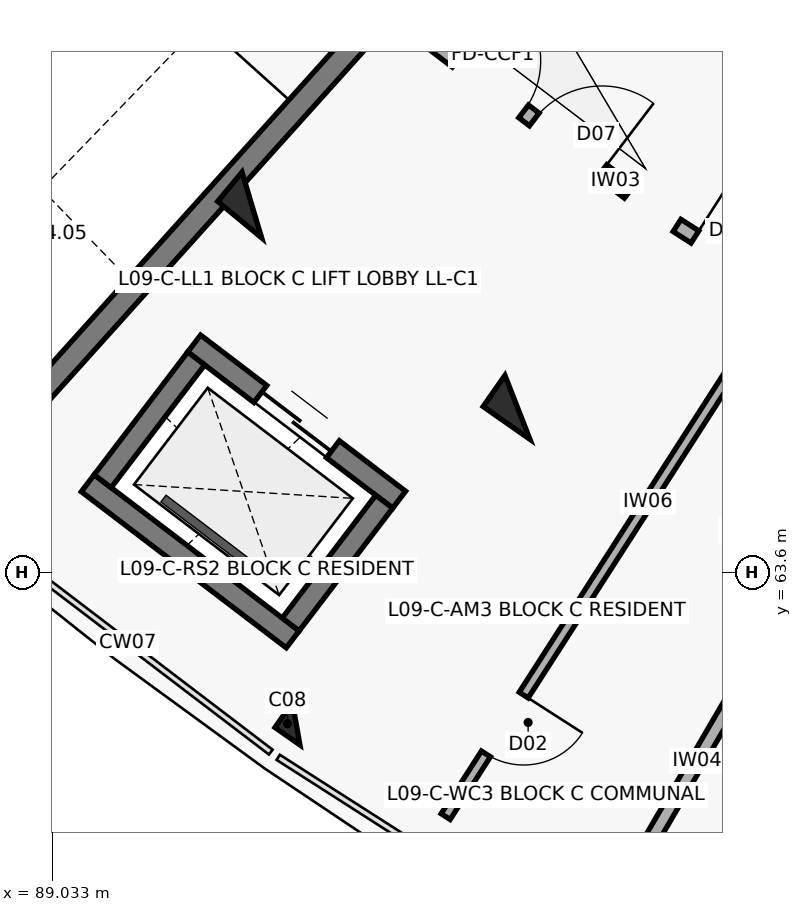
"""IFC4 building model, lengths in metres.
Left out: names, types, materials, properties, quantities, classifications, styles, units other than length and angle.
Written with IfcOpenShell. Run it as: python <this file> out.ifc"""

import sys

from ifc_helpers import new_model, si_unit, direction, frame, frame_2d, origin, origin_2d, place, context, subcontext, project, spatial, rectangle, extrude, element, fill, save


model = new_model("IFC4")
c1 = context("Model", 3, precision=1e-05, world=origin(), true_north=direction((0.0, 1.0)))
c2 = subcontext(c1, "Body", "Model", "MODEL_VIEW")
j1 = project(units=[si_unit("LENGTHUNIT", "METRE"), si_unit("PLANEANGLEUNIT", "RADIAN")], contexts=[c1])
p1 = place(None, origin())
s1 = spatial("IfcSite", under=j1, at=p1, CompositionType="ELEMENT")
p2 = place(p1, origin())
s2 = spatial("IfcBuilding", under=s1, at=p2, CompositionType="ELEMENT")
p3 = place(p2, frame((0.0, 0.0, 29.8)))
s3 = spatial("IfcBuildingStorey", under=s2, at=p3, CompositionType="ELEMENT", Elevation=29.8)
for number, where, z_axis, x_axis in (
    (1, (91.658, 68.43, 0.0), (0.0, 0.0, 1.0), (-0.638, -0.77, 0.0)),
    (2, (95.152, 65.768, 0.0), (0.0, 0.0, 1.0), (-0.573, -0.82, 0.0)),
):
    element("IfcColumn", number, at=place(p3, frame(where, z_axis=z_axis, x_axis=x_axis)), inside=s3, PredefinedType="COLUMN", context=c2, shape_type="SweptSolid", body=[
        extrude(rectangle(XDim=0.5, YDim=0.75, at=origin_2d()), origin(), (0.0, 0.0, 1.0), 3.1),
    ])
p4 = place(p3, frame((92.241, 61.605, 0.0), z_axis=(0.0, 0.0, 1.0), x_axis=(-0.573004420611, -0.819552276527, 0.0)))
e3 = element("IfcColumn", 3, at=p4, inside=s3, PredefinedType="COLUMN", context=c2, shape_type="SweptSolid", body=[
    extrude(rectangle(XDim=0.4, YDim=0.4, at=origin_2d()), origin(), (0.0, 0.0, 1.0), 3.1),
])
p5 = place(p3, frame((90.671, 73.287, 0.0), z_axis=(0.0, 0.0, 1.0), x_axis=(-0.668885797871, -0.743365179038, 0.0)))
e4 = element("IfcWall", 4, at=p5, inside=s3, PredefinedType="SHEAR", context=c2, shape_type="SweptSolid", body=[
    extrude(rectangle(XDim=7.69, YDim=0.3, at=frame_2d((3.845, 0.0))), origin(), (0.0, 0.0, 1.0), 3.1),
])
p6 = place(p3, frame((93.325, 70.899, 0.0), z_axis=(0.0, 0.0, 1.0), x_axis=(-0.668868253964, -0.743380964808, 0.0)))
e5 = element("IfcWall", 5, at=p6, inside=s3, PredefinedType="SHEAR", context=c2, shape_type="SweptSolid", body=[
    extrude(rectangle(XDim=7.69, YDim=0.3, at=frame_2d((3.845, 0.0))), origin(), (0.0, 0.0, 1.0), 3.1),
])
p7 = place(p3, frame((90.899, 66.607, 0.0), z_axis=(0.0, 0.0, 1.0), x_axis=(0.795439986025, -0.606032365994, 0.0)))
e6 = element("IfcWall", 6, at=p7, inside=s3, PredefinedType="SHEAR", context=c2, shape_type="SweptSolid", body=[
    extrude(rectangle(XDim=3.39, YDim=0.28, at=frame_2d((1.695, 0.0))), origin(), (0.0, 0.0, 1.0), 3.1),
])
p8 = place(p7, frame((1.095, 0.0, 0.0)))
e7 = element("IfcOpeningElement", 7, at=p8, cuts=e6, PredefinedType="OPENING", context=c2, shape_type="SweptSolid", body=[
    extrude(rectangle(XDim=1.2, YDim=2.15, at=frame_2d((0.6, 1.075))), frame((0.0, 0.15, 0.0), z_axis=(0.0, -1.0, 0.0), x_axis=(1.0, 0.0, 0.0)), (0.0, 0.0, 1.0), 0.3),
])
p9 = place(p3, frame((89.5, 64.77, 0.0), z_axis=(0.0, 0.0, 1.0), x_axis=(0.795474703455, -0.605986795371, 0.0)))
e8 = element("IfcWall", 8, at=p9, inside=s3, PredefinedType="SHEAR", context=c2, shape_type="SweptSolid", body=[
    extrude(rectangle(XDim=3.39, YDim=0.28, at=frame_2d((1.695, 0.0))), origin(), (0.0, 0.0, 1.0), 3.1),
])
p10 = place(p3, frame((90.926, 66.411, 0.0), z_axis=(0.0, 0.0, 1.0), x_axis=(-0.605948992168, -0.795503500238, 0.0)))
e9 = element("IfcWall", 9, at=p10, inside=s3, PredefinedType="SHEAR", context=c2, shape_type="SweptSolid", body=[
    extrude(rectangle(XDim=2.03, YDim=0.28, at=frame_2d((1.015, 0.0))), origin(), (0.0, 0.0, 1.0), 3.1),
])
p11 = place(p3, frame((93.4, 64.526, 0.0), z_axis=(0.0, 0.0, 1.0), x_axis=(-0.605891019062, -0.795547656033, 0.0)))
e10 = element("IfcWall", 10, at=p11, inside=s3, PredefinedType="SHEAR", context=c2, shape_type="SweptSolid", body=[
    extrude(rectangle(XDim=2.03, YDim=0.28, at=frame_2d((1.015, 0.0))), origin(), (0.0, 0.0, 1.0), 3.1),
])
p12 = place(p3, frame((94.001, 70.602, 0.0), z_axis=(0.0, 0.0, 1.0), x_axis=(0.795498026433, -0.605956178235, 0.0)))
e11 = element("IfcWall", 11, at=p12, inside=s3, PredefinedType="SOLIDWALL", context=c2, shape_type="SweptSolid", body=[
    extrude(rectangle(XDim=3.296, YDim=0.21, at=frame_2d((1.648, 0.0))), origin(), (0.0, 0.0, 1.0), 2.14),
])
p13 = place(p12, frame((0.45, 0.0, 0.0)))
e12 = element("IfcOpeningElement", 12, at=p13, cuts=e11, PredefinedType="OPENING", context=c2, shape_type="SweptSolid", body=[
    extrude(rectangle(XDim=1.1, YDim=2.15, at=frame_2d((0.55, 1.075))), frame((0.0, 0.115, 0.0), z_axis=(0.0, -1.0, 0.0), x_axis=(1.0, 0.0, 0.0)), (0.0, 0.0, 1.0), 0.23),
])
p14 = place(p12, frame((1.726, 0.0, 0.0)))
e13 = element("IfcOpeningElement", 13, at=p14, cuts=e11, PredefinedType="OPENING", context=c2, shape_type="SweptSolid", body=[
    extrude(rectangle(XDim=1.12, YDim=2.15, at=frame_2d((0.56, 1.075))), frame((0.0, 0.115, 0.0), z_axis=(0.0, -1.0, 0.0), x_axis=(1.0, 0.0, 0.0)), (0.0, 0.0, 1.0), 0.23),
])
p15 = place(p3, frame((97.252, 68.161, 0.0), z_axis=(0.0, 0.0, 1.0), x_axis=(0.842289466461, -0.53902546757, 0.0)))
e14 = element("IfcWall", 14, at=p15, inside=s3, PredefinedType="SOLIDWALL", context=c2, shape_type="SweptSolid", body=[
    extrude(rectangle(XDim=3.436, YDim=0.19, at=frame_2d((1.718, 0.0))), origin(), (0.0, 0.0, 1.0), 2.14),
])
p16 = place(p15, frame((0.28, 0.0, 0.0)))
e15 = element("IfcOpeningElement", 15, at=p16, cuts=e14, PredefinedType="OPENING", context=c2, shape_type="SweptSolid", body=[
    extrude(rectangle(XDim=1.12, YDim=2.15, at=frame_2d((0.56, 1.075))), frame((0.0, 0.105, 0.0), z_axis=(0.0, -1.0, 0.0), x_axis=(1.0, 0.0, 0.0)), (0.0, 0.0, 1.0), 0.21),
])
p17 = place(p15, frame((2.266, 0.0, 0.0)))
e16 = element("IfcOpeningElement", 16, at=p17, cuts=e14, PredefinedType="OPENING", context=c2, shape_type="SweptSolid", body=[
    extrude(rectangle(XDim=0.95, YDim=2.1, at=frame_2d((0.475, 1.05))), frame((0.0, 0.105, 0.0), z_axis=(0.0, -1.0, 0.0), x_axis=(1.0, 0.0, 0.0)), (0.0, 0.0, 1.0), 0.21),
])
p18 = place(p3, frame((98.504, 67.072, 0.0), z_axis=(0.0, 0.0, 1.0), x_axis=(-0.540338452216, -0.841447774408, 0.0)))
e17 = element("IfcWall", 17, at=p18, inside=s3, PredefinedType="PARTITIONING", context=c2, shape_type="SweptSolid", body=[
    extrude(rectangle(XDim=7.95, YDim=0.14, at=frame_2d((3.975, 0.0))), origin(), (0.0, 0.0, 1.0), 2.14),
])
p19 = place(p18, frame((6.05, 0.0, 0.0)))
e18 = element("IfcOpeningElement", 18, at=p19, cuts=e17, PredefinedType="OPENING", context=c2, shape_type="SweptSolid", body=[
    extrude(rectangle(XDim=0.92, YDim=2.1, at=frame_2d((0.46, 1.05))), frame((0.0, 0.08, 0.0), z_axis=(0.0, -1.0, 0.0), x_axis=(1.0, 0.0, 0.0)), (0.0, 0.0, 1.0), 0.16),
])
p20 = place(p3, frame((98.601, 62.968, 0.0), z_axis=(0.0, 0.0, 1.0), x_axis=(-0.504216452091, -0.863577309475, 0.0)))
e19 = element("IfcWall", 19, at=p20, inside=s3, PredefinedType="SOLIDWALL", context=c2, shape_type="SweptSolid", body=[
    extrude(rectangle(XDim=4.35, YDim=0.185, at=frame_2d((2.175, 0.0))), origin(), (0.0, 0.0, 1.0), 2.14),
])
p21 = place(p8, origin())
e20 = element("IfcDoor", 20, at=p21, inside=s3, OperationType="DOUBLE_DOOR_SLIDING", PredefinedType="DOOR", context=c2, shape_type="SweptSolid", body=[
    extrude(rectangle(XDim=1.2, YDim=2.15, at=frame_2d((0.6, 1.075))), frame((0.0, 0.025, 0.0), z_axis=(0.0, -1.0, 0.0), x_axis=(1.0, 0.0, 0.0)), (0.0, 0.0, 1.0), 0.05),
])
fill(e7, e20)
p22 = place(p13, origin())
e21 = element("IfcDoor", 21, at=p22, inside=s3, OperationType="SINGLE_SWING_LEFT", PredefinedType="DOOR", context=c2, shape_type="SweptSolid", body=[
    extrude(rectangle(XDim=1.1, YDim=2.15, at=frame_2d((0.55, 1.075))), frame((0.0, 0.025, 0.0), z_axis=(0.0, -1.0, 0.0), x_axis=(1.0, 0.0, 0.0)), (0.0, 0.0, 1.0), 0.05),
])
fill(e12, e21)
p23 = place(p14, origin())
e22 = element("IfcDoor", 22, at=p23, inside=s3, OperationType="SINGLE_SWING_RIGHT", PredefinedType="DOOR", context=c2, shape_type="SweptSolid", body=[
    extrude(rectangle(XDim=1.12, YDim=2.15, at=frame_2d((0.56, 1.075))), frame((0.0, 0.025, 0.0), z_axis=(0.0, -1.0, 0.0), x_axis=(1.0, 0.0, 0.0)), (0.0, 0.0, 1.0), 0.05),
])
fill(e13, e22)
p24 = place(p16, origin())
e23 = element("IfcDoor", 23, at=p24, inside=s3, OperationType="SINGLE_SWING_LEFT", PredefinedType="DOOR", context=c2, shape_type="SweptSolid", body=[
    extrude(rectangle(XDim=1.12, YDim=2.15, at=frame_2d((0.56, 1.075))), frame((0.0, 0.025, 0.0), z_axis=(0.0, -1.0, 0.0), x_axis=(1.0, 0.0, 0.0)), (0.0, 0.0, 1.0), 0.05),
])
fill(e15, e23)
p25 = place(p19, origin())
e24 = element("IfcDoor", 24, at=p25, inside=s3, OperationType="SINGLE_SWING_LEFT", PredefinedType="DOOR", context=c2, shape_type="SweptSolid", body=[
    extrude(rectangle(XDim=0.92, YDim=2.1, at=frame_2d((0.46, 1.05))), frame((0.0, 0.025, 0.0), z_axis=(0.0, -1.0, 0.0), x_axis=(1.0, 0.0, 0.0)), (0.0, 0.0, 1.0), 0.05),
])
fill(e18, e24)
save(model, sys.argv[1])
